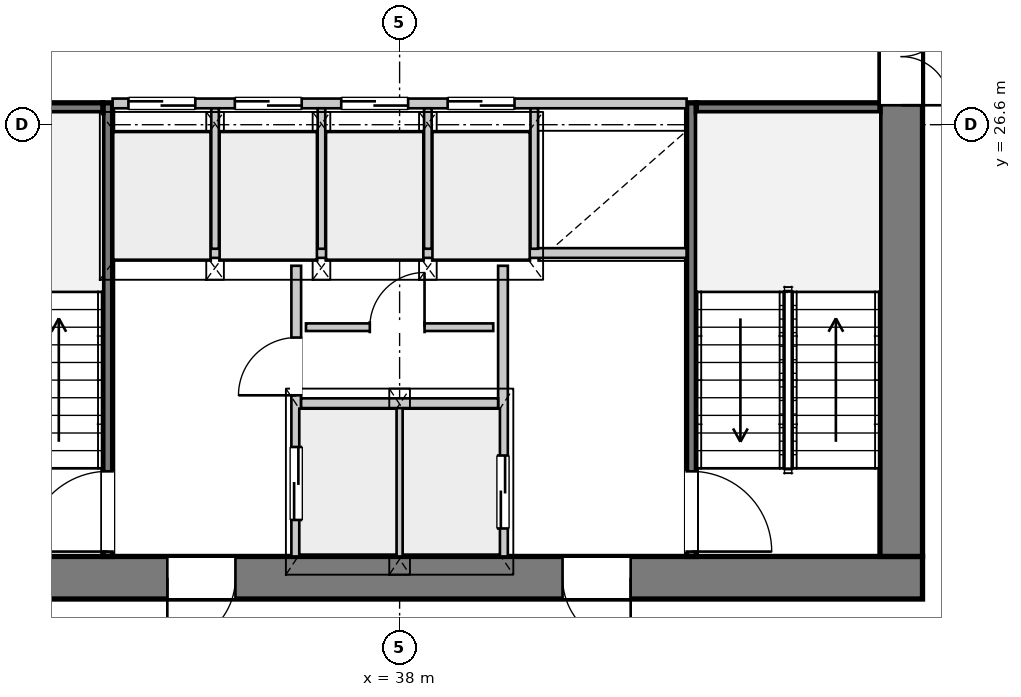
"""IFC4 building model, lengths in metres.
Left out: names, types, materials, properties, quantities, classifications, styles, units other than length and angle.
Written with IfcOpenShell. Run it as: python <this file> out.ifc"""

import sys

from ifc_helpers import new_model, si_unit, direction, frame, frame_2d, origin, place, context, subcontext, project, spatial, rectangle, extrude, source, transform, mapped, element, fill, save


model = new_model("IFC4")
c1 = context("Model", 3, precision=1e-05, world=origin(), true_north=direction((0.0, 1.0)))
c2 = subcontext(c1, "Body", "Model", "MODEL_VIEW")
j1 = project(units=[si_unit("LENGTHUNIT", "METRE"), si_unit("PLANEANGLEUNIT", "RADIAN")], contexts=[c1])
p1 = place(None, origin())
s1 = spatial("IfcSite", under=j1, at=p1, CompositionType="ELEMENT")
p2 = place(p1, origin())
s2 = spatial("IfcBuilding", under=s1, at=p2, CompositionType="ELEMENT")
p3 = place(p2, frame((0.0, 0.0, 91.5)))
s3 = spatial("IfcBuildingStorey", under=s2, at=p3, CompositionType="ELEMENT", Elevation=91.5)
p4 = place(p3, frame((46.6, 19.15, 0.0), z_axis=(0.0, 0.0, 1.0), x_axis=(-1.0, 0.0, 0.0)))
e1 = element("IfcWall", 1, at=p4, inside=s3, PredefinedType="SHEAR", context=c2, shape_type="SweptSolid", body=[
    extrude(rectangle(XDim=17.2, YDim=0.7, at=frame_2d((8.6, 0.0))), origin(), (0.0, 0.0, 1.0), 3.3),
])
p5 = place(p4, frame((4.8, 0.0, 0.0)))
e2 = element("IfcOpeningElement", 2, at=p5, cuts=e1, PredefinedType="OPENING", context=c2, shape_type="SweptSolid", body=[
    extrude(rectangle(XDim=1.12, YDim=2.25, at=frame_2d((0.56, 1.125))), frame((0.0, 0.36, 0.0), z_axis=(0.0, -1.0, 0.0), x_axis=(1.0, 0.0, 0.0)), (0.0, 0.0, 1.0), 0.72),
])
p6 = place(p4, frame((11.3, 0.0, 0.0)))
e3 = element("IfcOpeningElement", 3, at=p6, cuts=e1, PredefinedType="OPENING", context=c2, shape_type="SweptSolid", body=[
    extrude(rectangle(XDim=1.12, YDim=2.25, at=frame_2d((0.56, 1.125))), frame((0.0, 0.36, 0.0), z_axis=(0.0, -1.0, 0.0), x_axis=(1.0, 0.0, 0.0)), (0.0, 0.0, 1.0), 0.72),
])
p7 = place(p3, frame((46.25, 33.7, 0.0), z_axis=(0.0, 0.0, 1.0), x_axis=(0.0, -1.0, 0.0)))
e4 = element("IfcWall", 4, at=p7, inside=s3, PredefinedType="SHEAR", context=c2, shape_type="SweptSolid", body=[
    extrude(rectangle(XDim=14.2, YDim=0.7, at=frame_2d((7.1, 0.0))), origin(), (0.0, 0.0, 1.0), 3.3),
])
p8 = place(p7, frame((5.18, 0.0, 0.0)))
e5 = element("IfcOpeningElement", 5, at=p8, cuts=e4, PredefinedType="OPENING", context=c2, shape_type="SweptSolid", body=[
    extrude(rectangle(XDim=1.6, YDim=2.2, at=frame_2d((0.8, 1.1))), frame((0.0, 0.36, 0.0), z_axis=(0.0, -1.0, 0.0), x_axis=(1.0, 0.0, 0.0)), (0.0, 0.0, 1.0), 0.72),
])
p9 = place(p3, frame((33.2, 19.5, 0.0), z_axis=(0.0, 0.0, 1.0), x_axis=(0.0, 1.0, 0.0)))
e6 = element("IfcWall", 6, at=p9, inside=s3, PredefinedType="PARTITIONING", context=c2, shape_type="SweptSolid", body=[
    extrude(rectangle(XDim=7.46, YDim=0.16, at=frame_2d((3.73, 0.0))), origin(), (0.0, 0.0, 1.0), 3.3),
])
p10 = place(p9, frame((0.08, 0.0, 0.0)))
e7 = element("IfcOpeningElement", 7, at=p10, cuts=e6, PredefinedType="OPENING", context=c2, shape_type="SweptSolid", body=[
    extrude(rectangle(XDim=1.32, YDim=2.2, at=frame_2d((0.66, 1.1))), frame((0.0, 0.09, 0.0), z_axis=(0.0, -1.0, 0.0), x_axis=(1.0, 0.0, 0.0)), (0.0, 0.0, 1.0), 0.18),
])
p11 = place(p3, frame((30.1, 26.88, 0.0), z_axis=(0.0, 0.0, 1.0), x_axis=(1.0, 0.0, 0.0)))
e8 = element("IfcWall", 8, at=p11, inside=s3, PredefinedType="PARTITIONING", context=c2, shape_type="SweptSolid", body=[
    extrude(rectangle(XDim=3.02, YDim=0.16, at=frame_2d((1.51, 0.0))), origin(), (0.0, 0.0, 1.0), 3.3),
])
p12 = place(p3, frame((42.8, 26.96, 0.0), z_axis=(0.0, 0.0, 1.0), x_axis=(0.0, -1.0, 0.0)))
e9 = element("IfcWall", 9, at=p12, inside=s3, PredefinedType="PARTITIONING", context=c2, shape_type="SweptSolid", body=[
    extrude(rectangle(XDim=7.46, YDim=0.16, at=frame_2d((3.73, 0.0))), origin(), (0.0, 0.0, 1.0), 3.3),
])
p13 = place(p12, frame((6.06, 0.0, 0.0)))
e10 = element("IfcOpeningElement", 10, at=p13, cuts=e9, PredefinedType="OPENING", context=c2, shape_type="SweptSolid", body=[
    extrude(rectangle(XDim=1.32, YDim=2.2, at=frame_2d((0.66, 1.1))), frame((0.0, 0.09, 0.0), z_axis=(0.0, -1.0, 0.0), x_axis=(1.0, 0.0, 0.0)), (0.0, 0.0, 1.0), 0.18),
])
p14 = place(p3, frame((42.88, 26.88, 0.0), z_axis=(0.0, 0.0, 1.0), x_axis=(1.0, 0.0, 0.0)))
e11 = element("IfcWall", 11, at=p14, inside=s3, PredefinedType="PARTITIONING", context=c2, shape_type="SweptSolid", body=[
    extrude(rectangle(XDim=3.02, YDim=0.16, at=frame_2d((1.51, 0.0))), origin(), (0.0, 0.0, 1.0), 3.3),
])
p15 = place(p3, frame((36.3, 19.5, 0.0), z_axis=(0.0, 0.0, 1.0), x_axis=(0.0, 1.0, 0.0)))
e12 = element("IfcWall", 12, at=p15, inside=s3, PredefinedType="PARTITIONING", context=c2, shape_type="SweptSolid", body=[
    extrude(rectangle(XDim=4.78, YDim=0.16, at=frame_2d((2.39, 0.0))), origin(), (0.0, 0.0, 1.0), 3.3),
])
p16 = place(p15, frame((0.6, 0.0, 0.0)))
e13 = element("IfcOpeningElement", 13, at=p16, cuts=e12, PredefinedType="OPENING", context=c2, shape_type="SweptSolid", body=[
    extrude(rectangle(XDim=1.2, YDim=2.2, at=frame_2d((0.6, 1.1))), frame((0.0, 0.09, 0.0), z_axis=(0.0, -1.0, 0.0), x_axis=(1.0, 0.0, 0.0)), (0.0, 0.0, 1.0), 0.18),
])
p17 = place(p15, frame((2.65, 0.0, 0.0)))
e14 = element("IfcOpeningElement", 14, at=p17, cuts=e12, PredefinedType="OPENING", context=c2, shape_type="SweptSolid", body=[
    extrude(rectangle(XDim=0.95, YDim=2.1, at=frame_2d((0.475, 1.05))), frame((0.0, 0.09, 0.0), z_axis=(0.0, -1.0, 0.0), x_axis=(1.0, 0.0, 0.0)), (0.0, 0.0, 1.0), 0.18),
])
p18 = place(p3, frame((39.7, 24.28, 0.0), z_axis=(0.0, 0.0, 1.0), x_axis=(0.0, -1.0, 0.0)))
e15 = element("IfcWall", 15, at=p18, inside=s3, PredefinedType="PARTITIONING", context=c2, shape_type="SweptSolid", body=[
    extrude(rectangle(XDim=4.78, YDim=0.16, at=frame_2d((2.39, 0.0))), origin(), (0.0, 0.0, 1.0), 3.3),
])
p19 = place(p18, frame((3.12, 0.0, 0.0)))
e16 = element("IfcOpeningElement", 16, at=p19, cuts=e15, PredefinedType="OPENING", context=c2, shape_type="SweptSolid", body=[
    extrude(rectangle(XDim=1.2, YDim=2.2, at=frame_2d((0.6, 1.1))), frame((0.0, 0.09, 0.0), z_axis=(0.0, -1.0, 0.0), x_axis=(1.0, 0.0, 0.0)), (0.0, 0.0, 1.0), 0.18),
])
p20 = place(p3, frame((38.0, 19.5, 0.0), z_axis=(0.0, 0.0, 1.0), x_axis=(0.0, 1.0, 0.0)))
e17 = element("IfcWall", 17, at=p20, inside=s3, PredefinedType="PARTITIONING", context=c2, shape_type="SweptSolid", body=[
    extrude(rectangle(XDim=2.46, YDim=0.125, at=frame_2d((1.23, 0.0))), origin(), (0.0, 0.0, 1.0), 3.3),
])
p21 = place(p3, frame((36.38, 22.02, 0.0), z_axis=(0.0, 0.0, 1.0), x_axis=(1.0, 0.0, 0.0)))
e18 = element("IfcWall", 18, at=p21, inside=s3, PredefinedType="PARTITIONING", context=c2, shape_type="SweptSolid", body=[
    extrude(rectangle(XDim=3.24, YDim=0.16, at=frame_2d((1.62, 0.0))), origin(), (0.0, 0.0, 1.0), 3.3),
])
p22 = place(p3, frame((33.28, 24.49, 0.0), z_axis=(0.0, 0.0, 1.0), x_axis=(1.0, 0.0, 0.0)))
e19 = element("IfcWall", 19, at=p22, inside=s3, PredefinedType="PARTITIONING", context=c2, shape_type="SweptSolid", body=[
    extrude(rectangle(XDim=9.44, YDim=0.16, at=frame_2d((4.72, 0.0))), origin(), (0.0, 0.0, 1.0), 3.3),
])
p23 = place(p3, frame((36.46, 23.27, 0.0), z_axis=(0.0, 0.0, 1.0), x_axis=(1.0, 0.0, 0.0)))
e20 = element("IfcWall", 20, at=p23, inside=s3, PredefinedType="PARTITIONING", context=c2, shape_type="SweptSolid", body=[
    extrude(rectangle(XDim=3.08, YDim=0.125, at=frame_2d((1.54, 0.0))), origin(), (0.0, 0.0, 1.0), 3.3),
])
p24 = place(p23, frame((1.05, 0.0, 0.0)))
e21 = element("IfcOpeningElement", 21, at=p24, cuts=e20, PredefinedType="OPENING", context=c2, shape_type="SweptSolid", body=[
    extrude(rectangle(XDim=0.9, YDim=2.1, at=frame_2d((0.45, 1.05))), frame((0.0, 0.073, 0.0), z_axis=(0.0, -1.0, 0.0), x_axis=(1.0, 0.0, 0.0)), (0.0, 0.0, 1.0), 0.145),
])
p25 = place(p3, frame((33.28, 26.95, 0.0), z_axis=(0.0, 0.0, 1.0), x_axis=(1.0, 0.0, 0.0)))
e22 = element("IfcWall", 22, at=p25, inside=s3, PredefinedType="PARTITIONING", context=c2, shape_type="SweptSolid", body=[
    extrude(rectangle(XDim=9.44, YDim=0.16, at=frame_2d((4.72, 0.0))), origin(), (0.0, 0.0, 1.0), 3.3),
])
p26 = place(p25, frame((0.26, 0.0, 0.0)))
e23 = element("IfcOpeningElement", 23, at=p26, cuts=e22, PredefinedType="OPENING", context=c2, shape_type="SweptSolid", body=[
    extrude(rectangle(XDim=1.1, YDim=2.2, at=frame_2d((0.55, 1.1))), frame((0.0, 0.09, 0.0), z_axis=(0.0, -1.0, 0.0), x_axis=(1.0, 0.0, 0.0)), (0.0, 0.0, 1.0), 0.18),
])
p27 = place(p25, frame((2.01, 0.0, 0.0)))
e24 = element("IfcOpeningElement", 24, at=p27, cuts=e22, PredefinedType="OPENING", context=c2, shape_type="SweptSolid", body=[
    extrude(rectangle(XDim=1.1, YDim=2.2, at=frame_2d((0.55, 1.1))), frame((0.0, 0.09, 0.0), z_axis=(0.0, -1.0, 0.0), x_axis=(1.0, 0.0, 0.0)), (0.0, 0.0, 1.0), 0.18),
])
p28 = place(p25, frame((3.76, 0.0, 0.0)))
e25 = element("IfcOpeningElement", 25, at=p28, cuts=e22, PredefinedType="OPENING", context=c2, shape_type="SweptSolid", body=[
    extrude(rectangle(XDim=1.1, YDim=2.2, at=frame_2d((0.55, 1.1))), frame((0.0, 0.09, 0.0), z_axis=(0.0, -1.0, 0.0), x_axis=(1.0, 0.0, 0.0)), (0.0, 0.0, 1.0), 0.18),
])
p29 = place(p25, frame((5.51, 0.0, 0.0)))
e26 = element("IfcOpeningElement", 26, at=p29, cuts=e22, PredefinedType="OPENING", context=c2, shape_type="SweptSolid", body=[
    extrude(rectangle(XDim=1.1, YDim=2.2, at=frame_2d((0.55, 1.1))), frame((0.0, 0.09, 0.0), z_axis=(0.0, -1.0, 0.0), x_axis=(1.0, 0.0, 0.0)), (0.0, 0.0, 1.0), 0.18),
])
for number, where, z_axis, x_axis in (
    (27, (34.965, 24.56, 0.0), (0.0, 0.0, 1.0), (0.0, 1.0, 0.0)),
    (28, (36.715, 24.56, 0.0), (0.0, 0.0, 1.0), (0.0, 1.0, 0.0)),
    (29, (38.465, 24.56, 0.0), (0.0, 0.0, 1.0), (0.0, 1.0, 0.0)),
    (30, (40.215, 24.56, 0.0), (0.0, 0.0, 1.0), (0.0, 1.0, 0.0)),
):
    element("IfcWall", number, at=place(p3, frame(where, z_axis=z_axis, x_axis=x_axis)), inside=s3, PredefinedType="PARTITIONING", context=c2, shape_type="SweptSolid", body=[
        extrude(rectangle(XDim=2.31, YDim=0.125, at=frame_2d((1.155, 0.0))), origin(), (0.0, 0.0, 1.0), 3.3),
    ])
m1 = source(origin(), c2, "Body", "SweptSolid", [
    extrude(rectangle(XDim=1.12, YDim=2.25, at=frame_2d((0.56, 1.125))), frame((0.0, 0.025, 0.0), z_axis=(0.0, -1.0, 0.0), x_axis=(1.0, 0.0, 0.0)), (0.0, 0.0, 1.0), 0.05),
])
p30 = place(p5, origin())
e31 = element("IfcDoor", 31, at=p30, inside=s3, OperationType="SINGLE_SWING_LEFT", PredefinedType="DOOR", context=c2, shape_type="MappedRepresentation", body=[
    mapped(m1, transform((0.0, 0.0, 0.0), x_axis=(1.0, 0.0, 0.0), y_axis=(0.0, 1.0, 0.0), z_axis=(0.0, 0.0, 1.0), scale=1.0)),
])
fill(e2, e31)
p31 = place(p6, origin())
e32 = element("IfcDoor", 32, at=p31, inside=s3, OperationType="SINGLE_SWING_RIGHT", PredefinedType="DOOR", context=c2, shape_type="MappedRepresentation", body=[
    mapped(m1, transform((0.0, 0.0, 0.0), x_axis=(1.0, 0.0, 0.0), y_axis=(0.0, 1.0, 0.0), z_axis=(0.0, 0.0, 1.0), scale=1.0)),
])
fill(e3, e32)
m2 = source(origin(), c2, "Body", "SweptSolid", [
    extrude(rectangle(XDim=1.6, YDim=2.2, at=frame_2d((0.8, 1.1))), frame((0.0, 0.025, 0.0), z_axis=(0.0, -1.0, 0.0), x_axis=(1.0, 0.0, 0.0)), (0.0, 0.0, 1.0), 0.05),
])
p32 = place(p8, origin())
e33 = element("IfcDoor", 33, at=p32, inside=s3, OperationType="DOUBLE_DOOR_SINGLE_SWING", PredefinedType="DOOR", context=c2, shape_type="MappedRepresentation", body=[
    mapped(m2, transform((0.0, 0.0, 0.0), x_axis=(1.0, 0.0, 0.0), y_axis=(0.0, 1.0, 0.0), z_axis=(0.0, 0.0, 1.0), scale=1.0)),
])
fill(e5, e33)
m3 = source(origin(), c2, "Body", "SweptSolid", [
    extrude(rectangle(XDim=1.32, YDim=2.2, at=frame_2d((0.66, 1.1))), frame((0.0, 0.025, 0.0), z_axis=(0.0, -1.0, 0.0), x_axis=(1.0, 0.0, 0.0)), (0.0, 0.0, 1.0), 0.05),
])
p33 = place(p10, origin())
e34 = element("IfcDoor", 34, at=p33, inside=s3, OperationType="SINGLE_SWING_LEFT", PredefinedType="DOOR", context=c2, shape_type="MappedRepresentation", body=[
    mapped(m3, transform((0.0, 0.0, 0.0), x_axis=(1.0, 0.0, 0.0), y_axis=(0.0, 1.0, 0.0), z_axis=(0.0, 0.0, 1.0), scale=1.0)),
])
fill(e7, e34)
p34 = place(p13, origin())
e35 = element("IfcDoor", 35, at=p34, inside=s3, OperationType="SINGLE_SWING_RIGHT", PredefinedType="DOOR", context=c2, shape_type="MappedRepresentation", body=[
    mapped(m3, transform((0.0, 0.0, 0.0), x_axis=(1.0, 0.0, 0.0), y_axis=(0.0, 1.0, 0.0), z_axis=(0.0, 0.0, 1.0), scale=1.0)),
])
fill(e10, e35)
m4 = source(origin(), c2, "Body", "SweptSolid", [
    extrude(rectangle(XDim=1.2, YDim=2.2, at=frame_2d((0.6, 1.1))), frame((0.0, 0.025, 0.0), z_axis=(0.0, -1.0, 0.0), x_axis=(1.0, 0.0, 0.0)), (0.0, 0.0, 1.0), 0.05),
])
p35 = place(p16, origin())
e36 = element("IfcDoor", 36, at=p35, inside=s3, OperationType="DOUBLE_DOOR_SLIDING", PredefinedType="DOOR", context=c2, shape_type="MappedRepresentation", body=[
    mapped(m4, transform((0.0, 0.0, 0.0), x_axis=(1.0, 0.0, 0.0), y_axis=(0.0, 1.0, 0.0), z_axis=(0.0, 0.0, 1.0), scale=1.0)),
])
fill(e13, e36)
m5 = source(origin(), c2, "Body", "SweptSolid", [
    extrude(rectangle(XDim=0.95, YDim=2.1, at=frame_2d((0.475, 1.05))), frame((0.0, 0.025, 0.0), z_axis=(0.0, -1.0, 0.0), x_axis=(1.0, 0.0, 0.0)), (0.0, 0.0, 1.0), 0.05),
])
p36 = place(p17, origin())
e37 = element("IfcDoor", 37, at=p36, inside=s3, OperationType="SINGLE_SWING_LEFT", PredefinedType="DOOR", context=c2, shape_type="MappedRepresentation", body=[
    mapped(m5, transform((0.0, 0.0, 0.0), x_axis=(1.0, 0.0, 0.0), y_axis=(0.0, 1.0, 0.0), z_axis=(0.0, 0.0, 1.0), scale=1.0)),
])
fill(e14, e37)
m6 = source(origin(), c2, "Body", "SweptSolid", [
    extrude(rectangle(XDim=0.9, YDim=2.1, at=frame_2d((0.45, 1.05))), frame((0.0, 0.025, 0.0), z_axis=(0.0, -1.0, 0.0), x_axis=(1.0, 0.0, 0.0)), (0.0, 0.0, 1.0), 0.05),
])
p37 = place(p24, origin())
e38 = element("IfcDoor", 38, at=p37, inside=s3, OperationType="SINGLE_SWING_RIGHT", PredefinedType="DOOR", context=c2, shape_type="MappedRepresentation", body=[
    mapped(m6, transform((0.0, 0.0, 0.0), x_axis=(1.0, 0.0, 0.0), y_axis=(0.0, 1.0, 0.0), z_axis=(0.0, 0.0, 1.0), scale=1.0)),
])
fill(e21, e38)
p38 = place(p19, origin())
e39 = element("IfcDoor", 39, at=p38, inside=s3, OperationType="DOUBLE_DOOR_SLIDING", PredefinedType="DOOR", context=c2, shape_type="MappedRepresentation", body=[
    mapped(m4, transform((0.0, 0.0, 0.0), x_axis=(1.0, 0.0, 0.0), y_axis=(0.0, 1.0, 0.0), z_axis=(0.0, 0.0, 1.0), scale=1.0)),
])
fill(e16, e39)
m7 = source(origin(), c2, "Body", "SweptSolid", [
    extrude(rectangle(XDim=1.1, YDim=2.2, at=frame_2d((0.55, 1.1))), frame((0.0, 0.025, 0.0), z_axis=(0.0, -1.0, 0.0), x_axis=(1.0, 0.0, 0.0)), (0.0, 0.0, 1.0), 0.05),
])
p39 = place(p26, origin())
e40 = element("IfcDoor", 40, at=p39, inside=s3, OperationType="DOUBLE_DOOR_SLIDING", PredefinedType="DOOR", context=c2, shape_type="MappedRepresentation", body=[
    mapped(m7, transform((0.0, 0.0, 0.0), x_axis=(1.0, 0.0, 0.0), y_axis=(0.0, 1.0, 0.0), z_axis=(0.0, 0.0, 1.0), scale=1.0)),
])
fill(e23, e40)
p40 = place(p27, origin())
e41 = element("IfcDoor", 41, at=p40, inside=s3, OperationType="DOUBLE_DOOR_SLIDING", PredefinedType="DOOR", context=c2, shape_type="MappedRepresentation", body=[
    mapped(m7, transform((0.0, 0.0, 0.0), x_axis=(1.0, 0.0, 0.0), y_axis=(0.0, 1.0, 0.0), z_axis=(0.0, 0.0, 1.0), scale=1.0)),
])
fill(e24, e41)
p41 = place(p28, origin())
e42 = element("IfcDoor", 42, at=p41, inside=s3, OperationType="DOUBLE_DOOR_SLIDING", PredefinedType="DOOR", context=c2, shape_type="MappedRepresentation", body=[
    mapped(m7, transform((0.0, 0.0, 0.0), x_axis=(1.0, 0.0, 0.0), y_axis=(0.0, 1.0, 0.0), z_axis=(0.0, 0.0, 1.0), scale=1.0)),
])
fill(e25, e42)
p42 = place(p29, origin())
e43 = element("IfcDoor", 43, at=p42, inside=s3, OperationType="DOUBLE_DOOR_SLIDING", PredefinedType="DOOR", context=c2, shape_type="MappedRepresentation", body=[
    mapped(m7, transform((0.0, 0.0, 0.0), x_axis=(1.0, 0.0, 0.0), y_axis=(0.0, 1.0, 0.0), z_axis=(0.0, 0.0, 1.0), scale=1.0)),
])
fill(e26, e43)
save(model, sys.argv[1])
